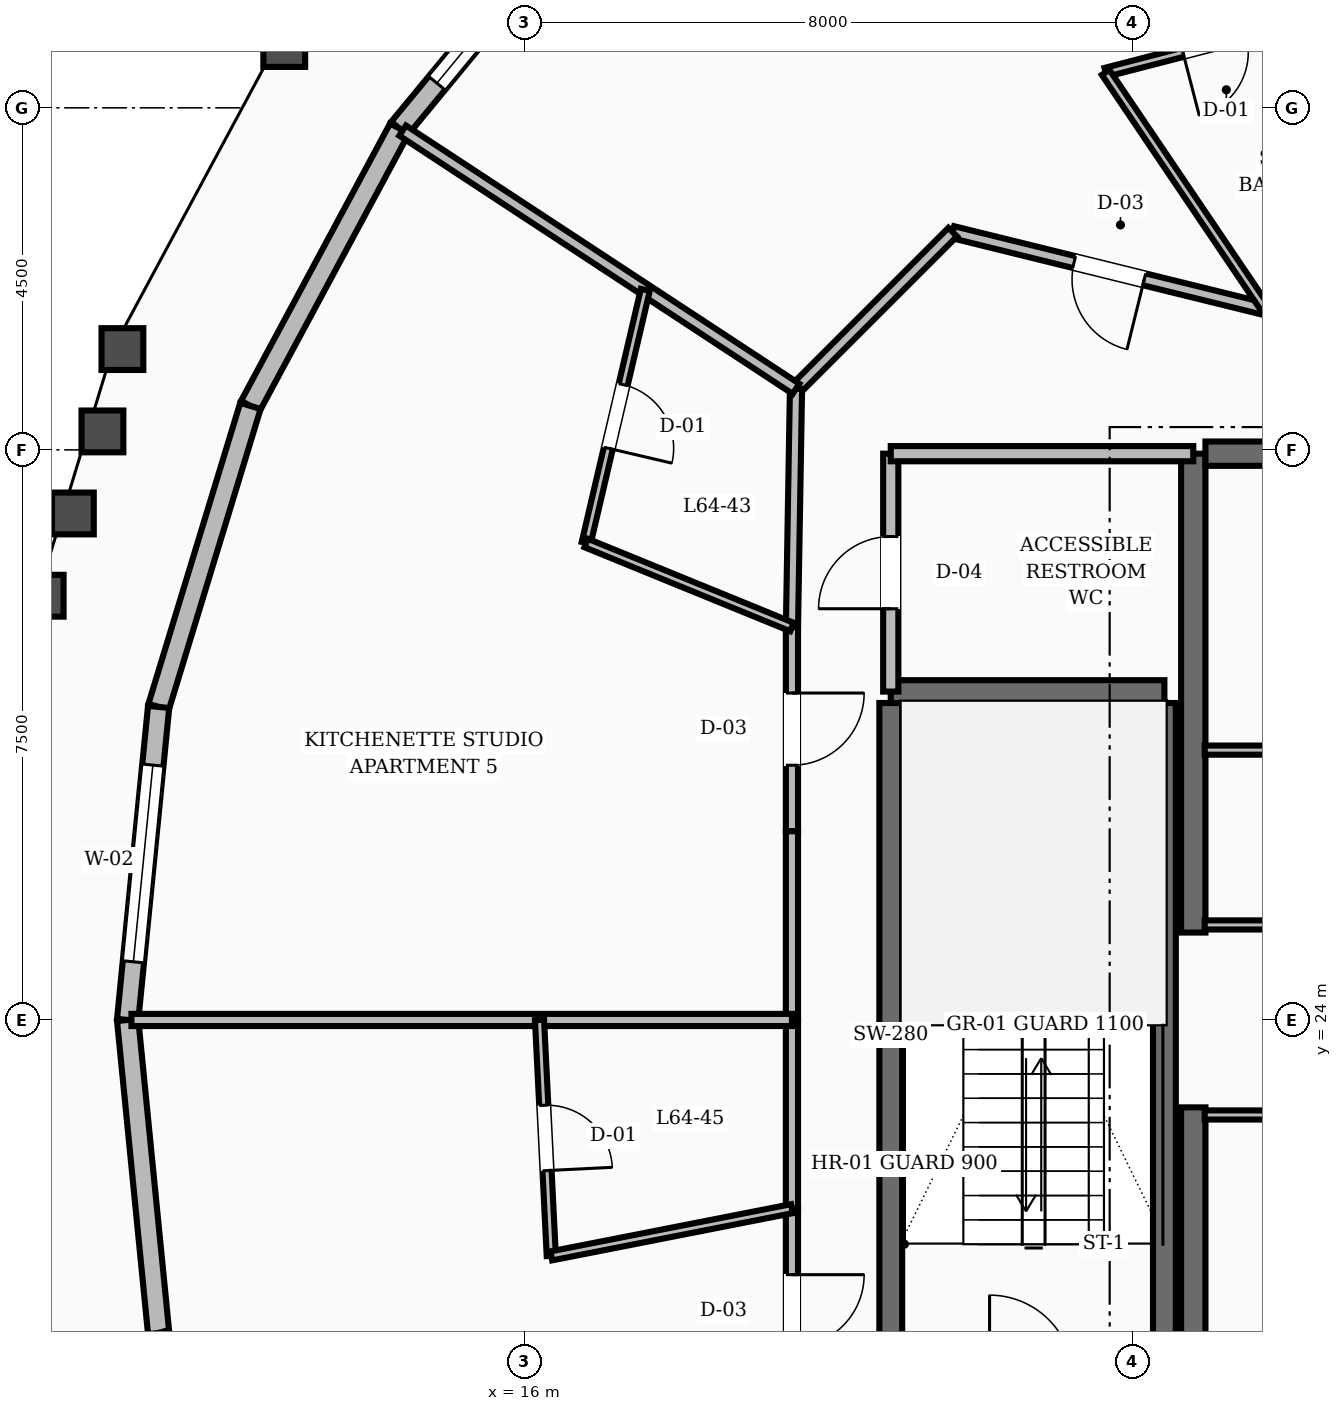
"""IFC4 building model, lengths in metres.
Left out: names, types, materials, properties, quantities, classifications, styles, units other than length and angle.
Written with IfcOpenShell. Run it as: python <this file> out.ifc"""

import sys

from ifc_helpers import new_model, si_unit, direction, frame, frame_2d, origin, place, context, subcontext, project, spatial, rectangle, extrude, element, fill, save


model = new_model("IFC4")
c1 = context("Model", 3, precision=1e-05, world=origin(), true_north=direction((0.0, 1.0)))
c2 = subcontext(c1, "Body", "Model", "MODEL_VIEW")
j1 = project(units=[si_unit("LENGTHUNIT", "METRE"), si_unit("PLANEANGLEUNIT", "RADIAN")], contexts=[c1])
p1 = place(None, origin())
s1 = spatial("IfcSite", under=j1, at=p1, CompositionType="ELEMENT")
p2 = place(p1, origin())
s2 = spatial("IfcBuilding", under=s1, at=p2, CompositionType="ELEMENT")
p3 = place(p2, frame((0.0, 0.0, 247.2)))
s3 = spatial("IfcBuildingStorey", under=s2, at=p3, CompositionType="ELEMENT", Elevation=247.2)
for number, where, z_axis, x_axis in (
    (1, (24.8, 16.55, 0.0), (0.0, 0.0, 1.0), (0.0, 1.0, 0.0)),
    (2, (24.8, 25.15, 0.0), (0.0, 0.0, 1.0), (0.0, 1.0, 0.0)),
):
    element("IfcWall", number, at=place(p3, frame(where, z_axis=z_axis, x_axis=x_axis)), inside=s3, PredefinedType="SHEAR", context=c2, shape_type="SweptSolid", body=[
        extrude(rectangle(XDim=6.3, YDim=0.32, at=frame_2d((3.15, 0.0))), origin(), (0.0, 0.0, 1.0), 3.6),
    ])
p4 = place(p3, frame((24.96, 31.45, 0.0), z_axis=(0.0, 0.0, 1.0), x_axis=(1.0, 0.0, 0.0)))
e3 = element("IfcWall", 3, at=p4, inside=s3, PredefinedType="SHEAR", context=c2, shape_type="SweptSolid", body=[
    extrude(rectangle(XDim=3.24, YDim=0.32, at=frame_2d((1.62, 0.0))), origin(), (0.0, 0.0, 1.0), 3.6),
])
for number, where, z_axis, x_axis in (
    (4, (20.82, 19.43, 0.0), (0.0, 0.0, 1.0), (0.0, 1.0, 0.0)),
    (5, (24.42, 19.43, 0.0), (0.0, 0.0, 1.0), (0.0, 1.0, 0.0)),
):
    element("IfcWall", number, at=place(p3, frame(where, z_axis=z_axis, x_axis=x_axis)), inside=s3, PredefinedType="SHEAR", context=c2, shape_type="SweptSolid", body=[
        extrude(rectangle(XDim=8.74, YDim=0.3, at=frame_2d((4.37, 0.0))), origin(), (0.0, 0.0, 1.0), 3.6),
    ])
p5 = place(p3, frame((20.82, 28.32, 0.0), z_axis=(0.0, 0.0, 1.0), x_axis=(1.0, 0.0, 0.0)))
e6 = element("IfcWall", 6, at=p5, inside=s3, PredefinedType="SHEAR", context=c2, shape_type="SweptSolid", body=[
    extrude(rectangle(XDim=3.6, YDim=0.3, at=frame_2d((1.8, 0.0))), origin(), (0.0, 0.0, 1.0), 3.6),
])
p6 = place(p3, frame((16.995, 38.927, 0.0), z_axis=(0.0, 0.0, 1.0), x_axis=(-0.63634880002, -0.771401454959, 0.0)))
e7 = element("IfcWall", 7, at=p6, inside=s3, PredefinedType="STANDARD", context=c2, shape_type="SweptSolid", body=[
    extrude(rectangle(XDim=4.147, YDim=0.28, at=frame_2d((2.073, 0.0))), origin(), (0.0, 0.0, 1.0), 2.88),
])
p7 = place(p6, frame((0.773, 0.0, 0.8)))
e8 = element("IfcOpeningElement", 8, at=p7, cuts=e7, PredefinedType="OPENING", context=c2, shape_type="SweptSolid", body=[
    extrude(rectangle(XDim=2.6, YDim=1.65, at=frame_2d((1.3, 0.825))), frame((0.0, 0.15, 0.0), z_axis=(0.0, -1.0, 0.0), x_axis=(1.0, 0.0, 0.0)), (0.0, 0.0, 1.0), 0.3),
])
p8 = place(p3, frame((14.356, 35.728, 0.0), z_axis=(0.0, 0.0, 1.0), x_axis=(-0.473326520675, -0.880887055658, 0.0)))
e9 = element("IfcWall", 9, at=p8, inside=s3, PredefinedType="STANDARD", context=c2, shape_type="SweptSolid", body=[
    extrude(rectangle(XDim=4.143, YDim=0.28, at=frame_2d((2.071, 0.0))), origin(), (0.0, 0.0, 1.0), 2.88),
])
p9 = place(p3, frame((12.396, 32.078, 0.0), z_axis=(0.0, 0.0, 1.0), x_axis=(-0.291673136786, -0.95651805068, 0.0)))
e10 = element("IfcWall", 10, at=p9, inside=s3, PredefinedType="STANDARD", context=c2, shape_type="SweptSolid", body=[
    extrude(rectangle(XDim=4.14, YDim=0.28, at=frame_2d((2.07, 0.0))), origin(), (0.0, 0.0, 1.0), 2.88),
])
p10 = place(p3, frame((11.188, 28.118, 0.0), z_axis=(0.0, 0.0, 1.0), x_axis=(-0.098516576832, -0.995135409926, 0.0)))
e11 = element("IfcWall", 11, at=p10, inside=s3, PredefinedType="STANDARD", context=c2, shape_type="SweptSolid", body=[
    extrude(rectangle(XDim=4.138, YDim=0.28, at=frame_2d((2.069, 0.0))), origin(), (0.0, 0.0, 1.0), 2.88),
])
p11 = place(p10, frame((0.769, 0.0, 0.8)))
e12 = element("IfcOpeningElement", 12, at=p11, cuts=e11, PredefinedType="OPENING", context=c2, shape_type="SweptSolid", body=[
    extrude(rectangle(XDim=2.6, YDim=1.65, at=frame_2d((1.3, 0.825))), frame((0.0, 0.15, 0.0), z_axis=(0.0, -1.0, 0.0), x_axis=(1.0, 0.0, 0.0)), (0.0, 0.0, 1.0), 0.3),
])
p12 = place(p3, frame((10.78, 24.0, 0.0), z_axis=(0.0, 0.0, 1.0), x_axis=(0.098516576832, -0.995135409926, 0.0)))
e13 = element("IfcWall", 13, at=p12, inside=s3, PredefinedType="STANDARD", context=c2, shape_type="SweptSolid", body=[
    extrude(rectangle(XDim=4.138, YDim=0.28, at=frame_2d((2.069, 0.0))), origin(), (0.0, 0.0, 1.0), 2.88),
])
p13 = place(p3, frame((11.188, 19.882, 0.0), z_axis=(0.0, 0.0, 1.0), x_axis=(0.291673136786, -0.95651805068, 0.0)))
e14 = element("IfcWall", 14, at=p13, inside=s3, PredefinedType="STANDARD", context=c2, shape_type="SweptSolid", body=[
    extrude(rectangle(XDim=4.14, YDim=0.28, at=frame_2d((2.07, 0.0))), origin(), (0.0, 0.0, 1.0), 2.88),
])
p14 = place(p3, frame((20.82, 28.32, 0.0), z_axis=(0.0, 0.0, 1.0), x_axis=(0.0, 1.0, 0.0)))
e15 = element("IfcWall", 15, at=p14, inside=s3, PredefinedType="SOLIDWALL", context=c2, shape_type="SweptSolid", body=[
    extrude(rectangle(XDim=3.13, YDim=0.2, at=frame_2d((1.565, 0.0))), origin(), (0.0, 0.0, 1.0), 2.87),
])
p15 = place(p14, frame((1.09, 0.0, 0.0)))
e16 = element("IfcOpeningElement", 16, at=p15, cuts=e15, PredefinedType="OPENING", context=c2, shape_type="SweptSolid", body=[
    extrude(rectangle(XDim=0.95, YDim=2.1, at=frame_2d((0.475, 1.05))), frame((0.0, 0.11, 0.0), z_axis=(0.0, -1.0, 0.0), x_axis=(1.0, 0.0, 0.0)), (0.0, 0.0, 1.0), 0.22),
])
p16 = place(p3, frame((20.82, 31.45, 0.0), z_axis=(0.0, 0.0, 1.0), x_axis=(1.0, 0.0, 0.0)))
e17 = element("IfcWall", 17, at=p16, inside=s3, PredefinedType="SOLIDWALL", context=c2, shape_type="SweptSolid", body=[
    extrude(rectangle(XDim=3.98, YDim=0.2, at=frame_2d((1.99, 0.0))), origin(), (0.0, 0.0, 1.0), 2.87),
])
p17 = place(p3, frame((24.95, 25.25, 0.0), z_axis=(0.0, 0.0, 1.0), x_axis=(1.0, 0.0, 0.0)))
e18 = element("IfcWall", 18, at=p17, inside=s3, PredefinedType="PARTITIONING", context=c2, shape_type="SweptSolid", body=[
    extrude(rectangle(XDim=3.2, YDim=0.12, at=frame_2d((1.6, 0.0))), origin(), (0.0, 0.0, 1.0), 2.87),
])
p18 = place(p17, frame((1.125, 0.0, 0.0)))
e19 = element("IfcOpeningElement", 19, at=p18, cuts=e18, PredefinedType="OPENING", context=c2, shape_type="SweptSolid", body=[
    extrude(rectangle(XDim=0.95, YDim=2.1, at=frame_2d((0.475, 1.05))), frame((0.0, 0.07, 0.0), z_axis=(0.0, -1.0, 0.0), x_axis=(1.0, 0.0, 0.0)), (0.0, 0.0, 1.0), 0.14),
])
p19 = place(p3, frame((24.95, 22.75, 0.0), z_axis=(0.0, 0.0, 1.0), x_axis=(1.0, 0.0, 0.0)))
e20 = element("IfcWall", 20, at=p19, inside=s3, PredefinedType="PARTITIONING", context=c2, shape_type="SweptSolid", body=[
    extrude(rectangle(XDim=3.2, YDim=0.12, at=frame_2d((1.6, 0.0))), origin(), (0.0, 0.0, 1.0), 2.87),
])
p20 = place(p19, frame((1.125, 0.0, 0.0)))
e21 = element("IfcOpeningElement", 21, at=p20, cuts=e20, PredefinedType="OPENING", context=c2, shape_type="SweptSolid", body=[
    extrude(rectangle(XDim=0.95, YDim=2.1, at=frame_2d((0.475, 1.05))), frame((0.0, 0.07, 0.0), z_axis=(0.0, -1.0, 0.0), x_axis=(1.0, 0.0, 0.0)), (0.0, 0.0, 1.0), 0.14),
])
p21 = place(p3, frame((24.95, 27.55, 0.0), z_axis=(0.0, 0.0, 1.0), x_axis=(1.0, 0.0, 0.0)))
e22 = element("IfcWall", 22, at=p21, inside=s3, PredefinedType="PARTITIONING", context=c2, shape_type="SweptSolid", body=[
    extrude(rectangle(XDim=3.2, YDim=0.12, at=frame_2d((1.6, 0.0))), origin(), (0.0, 0.0, 1.0), 2.87),
])
p22 = place(p21, frame((1.125, 0.0, 0.0)))
e23 = element("IfcOpeningElement", 23, at=p22, cuts=e22, PredefinedType="OPENING", context=c2, shape_type="SweptSolid", body=[
    extrude(rectangle(XDim=0.95, YDim=2.1, at=frame_2d((0.475, 1.05))), frame((0.0, 0.07, 0.0), z_axis=(0.0, -1.0, 0.0), x_axis=(1.0, 0.0, 0.0)), (0.0, 0.0, 1.0), 0.14),
])
p23 = place(p3, frame((25.752, 33.35, 0.0), z_axis=(0.0, 0.0, 1.0), x_axis=(-0.970939799552, 0.239323850978, 0.0)))
e24 = element("IfcWall", 24, at=p23, inside=s3, PredefinedType="SOLIDWALL", context=c2, shape_type="SweptSolid", body=[
    extrude(rectangle(XDim=4.241, YDim=0.16, at=frame_2d((2.12, 0.0))), origin(), (0.0, 0.0, 1.0), 2.87),
])
p24 = place(p23, frame((1.646, 0.0, 0.0)))
e25 = element("IfcOpeningElement", 25, at=p24, cuts=e24, PredefinedType="OPENING", context=c2, shape_type="SweptSolid", body=[
    extrude(rectangle(XDim=0.95, YDim=2.1, at=frame_2d((0.475, 1.05))), frame((0.0, 0.09, 0.0), z_axis=(0.0, -1.0, 0.0), x_axis=(1.0, 0.0, 0.0)), (0.0, 0.0, 1.0), 0.18),
])
p25 = place(p3, frame((21.635, 34.365, 0.0), z_axis=(0.0, 0.0, 1.0), x_axis=(-0.707106781187, -0.707106781187, 0.0)))
e26 = element("IfcWall", 26, at=p25, inside=s3, PredefinedType="SOLIDWALL", context=c2, shape_type="SweptSolid", body=[
    extrude(rectangle(XDim=2.916, YDim=0.16, at=frame_2d((1.458, 0.0))), origin(), (0.0, 0.0, 1.0), 2.87),
])
p26 = place(p3, frame((19.573, 32.303, 0.0), z_axis=(0.0, 0.0, 1.0), x_axis=(-0.016981035134, -0.999855811828, 0.0)))
e27 = element("IfcWall", 27, at=p26, inside=s3, PredefinedType="SOLIDWALL", context=c2, shape_type="SweptSolid", body=[
    extrude(rectangle(XDim=3.134, YDim=0.16, at=frame_2d((1.567, 0.0))), origin(), (0.0, 0.0, 1.0), 2.87),
])
p27 = place(p3, frame((19.52, 29.169, 0.0), z_axis=(0.0, 0.0, 1.0), x_axis=(0.0, -1.0, 0.0)))
e28 = element("IfcWall", 28, at=p27, inside=s3, PredefinedType="SOLIDWALL", context=c2, shape_type="SweptSolid", body=[
    extrude(rectangle(XDim=2.687, YDim=0.16, at=frame_2d((1.344, 0.0))), origin(), (0.0, 0.0, 1.0), 2.87),
])
p28 = place(p27, frame((0.868, 0.0, 0.0)))
e29 = element("IfcOpeningElement", 29, at=p28, cuts=e28, PredefinedType="OPENING", context=c2, shape_type="SweptSolid", body=[
    extrude(rectangle(XDim=0.95, YDim=2.1, at=frame_2d((0.475, 1.05))), frame((0.0, 0.09, 0.0), z_axis=(0.0, -1.0, 0.0), x_axis=(1.0, 0.0, 0.0)), (0.0, 0.0, 1.0), 0.18),
])
for number, where, z_axis, x_axis in (
    (30, (19.52, 26.482, 0.0), (0.0, 0.0, 1.0), (0.0, -1.0, 0.0)),
    (31, (19.52, 24.0, 0.0), (0.0, 0.0, 1.0), (0.0, -1.0, 0.0)),
):
    element("IfcWall", number, at=place(p3, frame(where, z_axis=z_axis, x_axis=x_axis)), inside=s3, PredefinedType="SOLIDWALL", context=c2, shape_type="SweptSolid", body=[
        extrude(rectangle(XDim=2.482, YDim=0.16, at=frame_2d((1.241, 0.0))), origin(), (0.0, 0.0, 1.0), 2.87),
    ])
p29 = place(p3, frame((19.52, 21.518, 0.0), z_axis=(0.0, 0.0, 1.0), x_axis=(0.0, -1.0, 0.0)))
e32 = element("IfcWall", 32, at=p29, inside=s3, PredefinedType="SOLIDWALL", context=c2, shape_type="SweptSolid", body=[
    extrude(rectangle(XDim=2.687, YDim=0.16, at=frame_2d((1.344, 0.0))), origin(), (0.0, 0.0, 1.0), 2.87),
])
p30 = place(p29, frame((0.868, 0.0, 0.0)))
e33 = element("IfcOpeningElement", 33, at=p30, cuts=e32, PredefinedType="OPENING", context=c2, shape_type="SweptSolid", body=[
    extrude(rectangle(XDim=0.95, YDim=2.1, at=frame_2d((0.475, 1.05))), frame((0.0, 0.09, 0.0), z_axis=(0.0, -1.0, 0.0), x_axis=(1.0, 0.0, 0.0)), (0.0, 0.0, 1.0), 0.18),
])
p31 = place(p3, frame((28.127, 33.35, 0.0), z_axis=(0.0, 0.0, 1.0), x_axis=(-0.385967865978, 0.922512225628, 0.0)))
e34 = element("IfcWall", 34, at=p31, inside=s3, PredefinedType="SOLIDWALL", context=c2, shape_type="SweptSolid", body=[
    extrude(rectangle(XDim=10.956, YDim=0.16, at=frame_2d((5.478, 0.0))), origin(), (0.0, 0.0, 1.0), 2.87),
])
p32 = place(p3, frame((26.513, 37.208, 0.0), z_axis=(0.0, 0.0, 1.0), x_axis=(-0.968151047418, -0.250366829639, 0.0)))
e35 = element("IfcWall", 35, at=p32, inside=s3, PredefinedType="PARTITIONING", context=c2, shape_type="SweptSolid", body=[
    extrude(rectangle(XDim=2.96, YDim=0.12, at=frame_2d((1.48, 0.0))), origin(), (0.0, 0.0, 1.0), 2.87),
])
p33 = place(p32, frame((1.05, 0.0, 0.0)))
e36 = element("IfcOpeningElement", 36, at=p33, cuts=e35, PredefinedType="OPENING", context=c2, shape_type="SweptSolid", body=[
    extrude(rectangle(XDim=0.86, YDim=2.1, at=frame_2d((0.43, 1.05))), frame((0.0, 0.07, 0.0), z_axis=(0.0, -1.0, 0.0), x_axis=(1.0, 0.0, 0.0)), (0.0, 0.0, 1.0), 0.14),
])
p34 = place(p3, frame((25.752, 33.35, 0.0), z_axis=(0.0, 0.0, 1.0), x_axis=(-0.559827300853, 0.828609312776, 0.0)))
e37 = element("IfcWall", 37, at=p34, inside=s3, PredefinedType="PARTITIONING", context=c2, shape_type="SweptSolid", body=[
    extrude(rectangle(XDim=3.761, YDim=0.12, at=frame_2d((1.881, 0.0))), origin(), (0.0, 0.0, 1.0), 2.87),
])
p35 = place(p3, frame((19.573, 32.303, 0.0), z_axis=(0.0, 0.0, 1.0), x_axis=(-0.835967060614, 0.548779622043, 0.0)))
e38 = element("IfcWall", 38, at=p35, inside=s3, PredefinedType="SOLIDWALL", context=c2, shape_type="SweptSolid", body=[
    extrude(rectangle(XDim=6.19, YDim=0.16, at=frame_2d((3.095, 0.0))), origin(), (0.0, 0.0, 1.0), 2.87),
])
p36 = place(p3, frame((17.591, 33.604, 0.0), z_axis=(0.0, 0.0, 1.0), x_axis=(-0.22755463123, -0.973765315569, 0.0)))
e39 = element("IfcWall", 39, at=p36, inside=s3, PredefinedType="PARTITIONING", context=c2, shape_type="SweptSolid", body=[
    extrude(rectangle(XDim=3.419, YDim=0.12, at=frame_2d((1.709, 0.0))), origin(), (0.0, 0.0, 1.0), 2.87),
])
p37 = place(p36, frame((1.28, 0.0, 0.0)))
e40 = element("IfcOpeningElement", 40, at=p37, cuts=e39, PredefinedType="OPENING", context=c2, shape_type="SweptSolid", body=[
    extrude(rectangle(XDim=0.86, YDim=2.1, at=frame_2d((0.43, 1.05))), frame((0.0, 0.07, 0.0), z_axis=(0.0, -1.0, 0.0), x_axis=(1.0, 0.0, 0.0)), (0.0, 0.0, 1.0), 0.14),
])
p38 = place(p3, frame((19.52, 29.169, 0.0), z_axis=(0.0, 0.0, 1.0), x_axis=(-0.925792790323, 0.37803136032, 0.0)))
e41 = element("IfcWall", 41, at=p38, inside=s3, PredefinedType="PARTITIONING", context=c2, shape_type="SweptSolid", body=[
    extrude(rectangle(XDim=2.924, YDim=0.12, at=frame_2d((1.462, 0.0))), origin(), (0.0, 0.0, 1.0), 2.87),
])
p39 = place(p3, frame((19.52, 24.0, 0.0), z_axis=(0.0, 0.0, 1.0), x_axis=(-1.0, 0.0, 0.0)))
e42 = element("IfcWall", 42, at=p39, inside=s3, PredefinedType="SOLIDWALL", context=c2, shape_type="SweptSolid", body=[
    extrude(rectangle(XDim=8.69, YDim=0.16, at=frame_2d((4.345, 0.0))), origin(), (0.0, 0.0, 1.0), 2.87),
])
p40 = place(p3, frame((16.199, 24.0, 0.0), z_axis=(0.0, 0.0, 1.0), x_axis=(0.049804404596, -0.998758990589, 0.0)))
e43 = element("IfcWall", 43, at=p40, inside=s3, PredefinedType="PARTITIONING", context=c2, shape_type="SweptSolid", body=[
    extrude(rectangle(XDim=3.108, YDim=0.12, at=frame_2d((1.554, 0.0))), origin(), (0.0, 0.0, 1.0), 2.87),
])
p41 = place(p40, frame((1.124, 0.0, 0.0)))
e44 = element("IfcOpeningElement", 44, at=p41, cuts=e43, PredefinedType="OPENING", context=c2, shape_type="SweptSolid", body=[
    extrude(rectangle(XDim=0.86, YDim=2.1, at=frame_2d((0.43, 1.05))), frame((0.0, 0.07, 0.0), z_axis=(0.0, -1.0, 0.0), x_axis=(1.0, 0.0, 0.0)), (0.0, 0.0, 1.0), 0.14),
])
p42 = place(p3, frame((19.52, 21.518, 0.0), z_axis=(0.0, 0.0, 1.0), x_axis=(-0.981270024306, -0.192637326076, 0.0)))
e45 = element("IfcWall", 45, at=p42, inside=s3, PredefinedType="PARTITIONING", context=c2, shape_type="SweptSolid", body=[
    extrude(rectangle(XDim=3.227, YDim=0.12, at=frame_2d((1.613, 0.0))), origin(), (0.0, 0.0, 1.0), 2.87),
])
p43 = place(p7, origin())
e46 = element("IfcWindow", 46, at=p43, inside=s3, PartitioningType="SINGLE_PANEL", PredefinedType="WINDOW", context=c2, shape_type="SweptSolid", body=[
    extrude(rectangle(XDim=2.6, YDim=1.65, at=frame_2d((1.3, 0.825))), frame((0.0, 0.03, 0.0), z_axis=(0.0, -1.0, 0.0), x_axis=(1.0, 0.0, 0.0)), (0.0, 0.0, 1.0), 0.06),
])
fill(e8, e46)
p44 = place(p11, origin())
e47 = element("IfcWindow", 47, at=p44, inside=s3, PartitioningType="SINGLE_PANEL", PredefinedType="WINDOW", context=c2, shape_type="SweptSolid", body=[
    extrude(rectangle(XDim=2.6, YDim=1.65, at=frame_2d((1.3, 0.825))), frame((0.0, 0.03, 0.0), z_axis=(0.0, -1.0, 0.0), x_axis=(1.0, 0.0, 0.0)), (0.0, 0.0, 1.0), 0.06),
])
fill(e12, e47)
p45 = place(p15, origin())
e48 = element("IfcDoor", 48, at=p45, inside=s3, OperationType="SINGLE_SWING_LEFT", PredefinedType="DOOR", context=c2, shape_type="SweptSolid", body=[
    extrude(rectangle(XDim=0.95, YDim=2.1, at=frame_2d((0.475, 1.05))), frame((0.0, 0.025, 0.0), z_axis=(0.0, -1.0, 0.0), x_axis=(1.0, 0.0, 0.0)), (0.0, 0.0, 1.0), 0.05),
])
fill(e16, e48)
p46 = place(p33, origin())
e49 = element("IfcDoor", 49, at=p46, inside=s3, OperationType="SINGLE_SWING_RIGHT", PredefinedType="DOOR", context=c2, shape_type="SweptSolid", body=[
    extrude(rectangle(XDim=0.86, YDim=2.1, at=frame_2d((0.43, 1.05))), frame((0.0, 0.025, 0.0), z_axis=(0.0, -1.0, 0.0), x_axis=(1.0, 0.0, 0.0)), (0.0, 0.0, 1.0), 0.05),
])
fill(e36, e49)
p47 = place(p24, origin())
e50 = element("IfcDoor", 50, at=p47, inside=s3, OperationType="SINGLE_SWING_LEFT", PredefinedType="DOOR", context=c2, shape_type="SweptSolid", body=[
    extrude(rectangle(XDim=0.95, YDim=2.1, at=frame_2d((0.475, 1.05))), frame((0.0, 0.025, 0.0), z_axis=(0.0, -1.0, 0.0), x_axis=(1.0, 0.0, 0.0)), (0.0, 0.0, 1.0), 0.05),
])
fill(e25, e50)
p48 = place(p37, origin())
e51 = element("IfcDoor", 51, at=p48, inside=s3, OperationType="SINGLE_SWING_RIGHT", PredefinedType="DOOR", context=c2, shape_type="SweptSolid", body=[
    extrude(rectangle(XDim=0.86, YDim=2.1, at=frame_2d((0.43, 1.05))), frame((0.0, 0.025, 0.0), z_axis=(0.0, -1.0, 0.0), x_axis=(1.0, 0.0, 0.0)), (0.0, 0.0, 1.0), 0.05),
])
fill(e40, e51)
p49 = place(p28, origin())
e52 = element("IfcDoor", 52, at=p49, inside=s3, OperationType="SINGLE_SWING_LEFT", PredefinedType="DOOR", context=c2, shape_type="SweptSolid", body=[
    extrude(rectangle(XDim=0.95, YDim=2.1, at=frame_2d((0.475, 1.05))), frame((0.0, 0.025, 0.0), z_axis=(0.0, -1.0, 0.0), x_axis=(1.0, 0.0, 0.0)), (0.0, 0.0, 1.0), 0.05),
])
fill(e29, e52)
p50 = place(p41, origin())
e53 = element("IfcDoor", 53, at=p50, inside=s3, OperationType="SINGLE_SWING_RIGHT", PredefinedType="DOOR", context=c2, shape_type="SweptSolid", body=[
    extrude(rectangle(XDim=0.86, YDim=2.1, at=frame_2d((0.43, 1.05))), frame((0.0, 0.025, 0.0), z_axis=(0.0, -1.0, 0.0), x_axis=(1.0, 0.0, 0.0)), (0.0, 0.0, 1.0), 0.05),
])
fill(e44, e53)
p51 = place(p30, origin())
e54 = element("IfcDoor", 54, at=p51, inside=s3, OperationType="SINGLE_SWING_LEFT", PredefinedType="DOOR", context=c2, shape_type="SweptSolid", body=[
    extrude(rectangle(XDim=0.95, YDim=2.1, at=frame_2d((0.475, 1.05))), frame((0.0, 0.025, 0.0), z_axis=(0.0, -1.0, 0.0), x_axis=(1.0, 0.0, 0.0)), (0.0, 0.0, 1.0), 0.05),
])
fill(e33, e54)
save(model, sys.argv[1])
